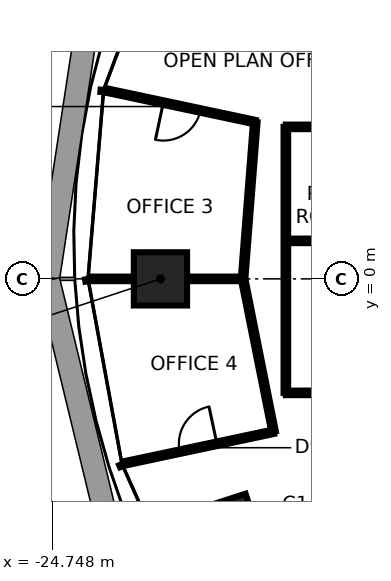
"""IFC4 building model, lengths in metres.
Left out: names, types, materials, properties, quantities, classifications, styles, units other than length and angle.
Written with IfcOpenShell. Run it as: python <this file> out.ifc"""

import sys

from ifc_helpers import new_model, si_unit, direction, frame, frame_2d, origin, origin_2d, place, context, subcontext, project, spatial, rectangle, extrude, element, fill, save


model = new_model("IFC4")
c1 = context("Model", 3, precision=1e-05, world=origin(), true_north=direction((0.0, 1.0)))
c2 = subcontext(c1, "Body", "Model", "MODEL_VIEW")
j1 = project(units=[si_unit("LENGTHUNIT", "METRE"), si_unit("PLANEANGLEUNIT", "RADIAN")], contexts=[c1])
p1 = place(None, origin())
s1 = spatial("IfcSite", under=j1, at=p1, CompositionType="ELEMENT")
p2 = place(p1, origin())
s2 = spatial("IfcBuilding", under=s1, at=p2, CompositionType="ELEMENT")
p3 = place(p2, frame((0.0, 0.0, 176.0)))
s3 = spatial("IfcBuildingStorey", under=s2, at=p3, CompositionType="ELEMENT", Elevation=176.0)
for number, where, z_axis, x_axis in (
    (1, (-20.808, 6.761, 0.0), (0.0, 0.0, 1.0), (-0.951, 0.309, 0.0)),
    (2, (-21.9, 0.0, 0.0), (0.0, 0.0, 1.0), (-1.0, 0.0, 0.0)),
    (3, (-20.109, -6.534, 0.0), (0.0, 0.0, 1.0), (-0.951, -0.309, 0.0)),
):
    element("IfcColumn", number, at=place(p3, frame(where, z_axis=z_axis, x_axis=x_axis)), inside=s3, PredefinedType="COLUMN", context=c2, shape_type="SweptSolid", body=[
        extrude(rectangle(XDim=1.4, YDim=1.4, at=origin_2d()), origin(), (0.0, 0.0, 1.0), 3.9),
    ])
p4 = place(p3, frame((-18.922, -4.022, 0.0), z_axis=(0.0, 0.0, 1.0), x_axis=(-0.195944435797, 0.980614999926, 0.0)))
e4 = element("IfcWall", 4, at=p4, inside=s3, PredefinedType="PARTITIONING", context=c2, shape_type="SweptSolid", body=[
    extrude(rectangle(XDim=4.102, YDim=0.12, at=frame_2d((2.051, 0.0))), origin(), (0.0, 0.0, 1.0), 3.74),
])
p5 = place(p3, frame((-18.6, -3.0, 0.0), z_axis=(0.0, 0.0, 1.0), x_axis=(1.0, 0.0, 0.0)))
e5 = element("IfcWall", 5, at=p5, inside=s3, PredefinedType="PARTITIONING", context=c2, shape_type="SweptSolid", body=[
    extrude(rectangle(XDim=2.6, YDim=0.12, at=frame_2d((1.3, 0.0))), origin(), (0.0, 0.0, 1.0), 3.74),
])
p6 = place(p5, frame((0.8, 0.0, 0.0)))
e6 = element("IfcOpeningElement", 6, at=p6, cuts=e5, PredefinedType="OPENING", context=c2, shape_type="SweptSolid", body=[
    extrude(rectangle(XDim=1.0, YDim=2.4, at=frame_2d((0.5, 1.2))), frame((0.0, 0.07, 0.0), z_axis=(0.0, -1.0, 0.0), x_axis=(1.0, 0.0, 0.0)), (0.0, 0.0, 1.0), 0.14),
])
p7 = place(p3, frame((-22.835, -4.854, 0.0), z_axis=(0.0, 0.0, 1.0), x_axis=(0.978152955943, 0.207886494942, 0.0)))
e7 = element("IfcWall", 7, at=p7, inside=s3, PredefinedType="PARTITIONING", context=c2, shape_type="SweptSolid", body=[
    extrude(rectangle(XDim=4.0, YDim=0.12, at=frame_2d((2.0, 0.0))), origin(), (0.0, 0.0, 1.0), 3.74),
])
p8 = place(p7, frame((1.474, 0.0, 0.0)))
e8 = element("IfcOpeningElement", 8, at=p8, cuts=e7, PredefinedType="OPENING", context=c2, shape_type="SweptSolid", body=[
    extrude(rectangle(XDim=1.0, YDim=2.4, at=frame_2d((0.5, 1.2))), frame((0.0, 0.07, 0.0), z_axis=(0.0, -1.0, 0.0), x_axis=(1.0, 0.0, 0.0)), (0.0, 0.0, 1.0), 0.14),
])
p9 = place(p3, frame((-16.0, 4.0, 0.0), z_axis=(0.0, 0.0, 1.0), x_axis=(-1.0, 0.0, 0.0)))
e9 = element("IfcWall", 9, at=p9, inside=s3, PredefinedType="PARTITIONING", context=c2, shape_type="SweptSolid", body=[
    extrude(rectangle(XDim=2.6, YDim=0.12, at=frame_2d((1.3, 0.0))), origin(), (0.0, 0.0, 1.0), 3.74),
])
p10 = place(p9, frame((0.8, 0.0, 0.0)))
e10 = element("IfcOpeningElement", 10, at=p10, cuts=e9, PredefinedType="OPENING", context=c2, shape_type="SweptSolid", body=[
    extrude(rectangle(XDim=1.0, YDim=2.4, at=frame_2d((0.5, 1.2))), frame((0.0, 0.07, 0.0), z_axis=(0.0, -1.0, 0.0), x_axis=(1.0, 0.0, 0.0)), (0.0, 0.0, 1.0), 0.14),
])
p11 = place(p3, frame((-19.405, 4.125, 0.0), z_axis=(0.0, 0.0, 1.0), x_axis=(-0.978140543132, 0.207944891454, 0.0)))
e11 = element("IfcWall", 11, at=p11, inside=s3, PredefinedType="PARTITIONING", context=c2, shape_type="SweptSolid", body=[
    extrude(rectangle(XDim=4.0, YDim=0.12, at=frame_2d((2.0, 0.0))), origin(), (0.0, 0.0, 1.0), 3.74),
])
p12 = place(p11, frame((1.474, 0.0, 0.0)))
e12 = element("IfcOpeningElement", 12, at=p12, cuts=e11, PredefinedType="OPENING", context=c2, shape_type="SweptSolid", body=[
    extrude(rectangle(XDim=1.0, YDim=2.4, at=frame_2d((0.5, 1.2))), frame((0.0, 0.07, 0.0), z_axis=(0.0, -1.0, 0.0), x_axis=(1.0, 0.0, 0.0)), (0.0, 0.0, 1.0), 0.14),
])
p13 = place(p3, frame((-19.726, 0.0, 0.0), z_axis=(0.0, 0.0, 1.0), x_axis=(0.077720864456, 0.996975158782, 0.0)))
e13 = element("IfcWall", 13, at=p13, inside=s3, PredefinedType="PARTITIONING", context=c2, shape_type="SweptSolid", body=[
    extrude(rectangle(XDim=4.137, YDim=0.12, at=frame_2d((2.068, 0.0))), origin(), (0.0, 0.0, 1.0), 3.74),
])
p14 = place(p3, frame((-18.6, 1.0, 0.0), z_axis=(0.0, 0.0, 1.0), x_axis=(1.0, 0.0, 0.0)))
e14 = element("IfcWall", 14, at=p14, inside=s3, PredefinedType="PARTITIONING", context=c2, shape_type="SweptSolid", body=[
    extrude(rectangle(XDim=2.6, YDim=0.12, at=frame_2d((1.3, 0.0))), origin(), (0.0, 0.0, 1.0), 3.74),
])
p15 = place(p3, frame((-18.6, 4.0, 0.0), z_axis=(0.0, 0.0, 1.0), x_axis=(0.0, -1.0, 0.0)))
e15 = element("IfcWall", 15, at=p15, inside=s3, PredefinedType="PARTITIONING", context=c2, shape_type="SweptSolid", body=[
    extrude(rectangle(XDim=7.0, YDim=0.12, at=frame_2d((3.5, 0.0))), origin(), (0.0, 0.0, 1.0), 3.74),
])
p16 = place(p3, frame((-19.726, 0.0, 0.0), z_axis=(0.0, 0.0, 1.0), x_axis=(-1.0, 0.0, 0.0)))
e16 = element("IfcWall", 16, at=p16, inside=s3, PredefinedType="PARTITIONING", context=c2, shape_type="SweptSolid", body=[
    extrude(rectangle(XDim=4.0, YDim=0.12, at=frame_2d((2.0, 0.0))), origin(), (0.0, 0.0, 1.0), 3.04),
])
p17 = place(p12, origin())
e17 = element("IfcDoor", 17, at=p17, inside=s3, OperationType="SINGLE_SWING_RIGHT", PredefinedType="DOOR", context=c2, shape_type="SweptSolid", body=[
    extrude(rectangle(XDim=1.0, YDim=2.4, at=frame_2d((0.5, 1.2))), frame((0.0, 0.025, 0.0), z_axis=(0.0, -1.0, 0.0), x_axis=(1.0, 0.0, 0.0)), (0.0, 0.0, 1.0), 0.05),
])
fill(e12, e17)
p18 = place(p8, origin())
e18 = element("IfcDoor", 18, at=p18, inside=s3, OperationType="SINGLE_SWING_RIGHT", PredefinedType="DOOR", context=c2, shape_type="SweptSolid", body=[
    extrude(rectangle(XDim=1.0, YDim=2.4, at=frame_2d((0.5, 1.2))), frame((0.0, 0.025, 0.0), z_axis=(0.0, -1.0, 0.0), x_axis=(1.0, 0.0, 0.0)), (0.0, 0.0, 1.0), 0.05),
])
fill(e8, e18)
save(model, sys.argv[1])
